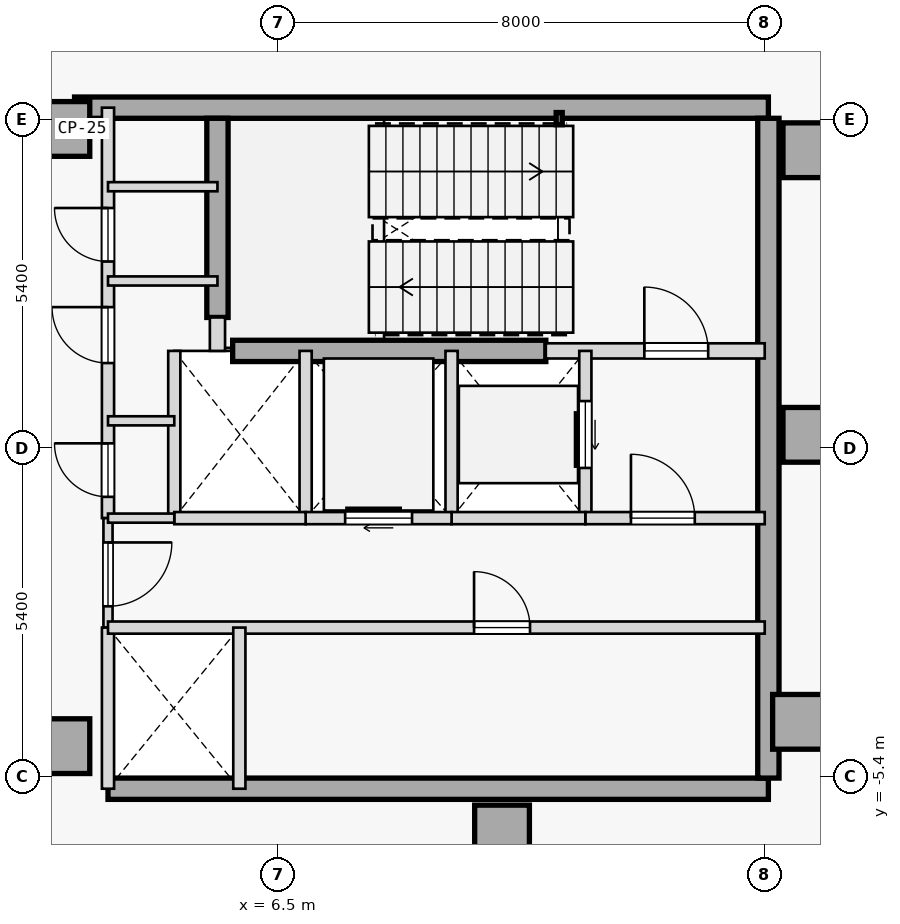
"""IFC4 building model, lengths in metres.
Left out: names, types, materials, properties, quantities, classifications, styles, units other than length and angle.
Written with IfcOpenShell. Run it as: python <this file> out.ifc"""

import sys

from ifc_helpers import new_model, si_unit, direction, frame, frame_2d, origin, origin_2d, place, context, subcontext, project, spatial, rectangle, hollow_rectangle, extrude, element, fill, save


model = new_model("IFC4")
c1 = context("Model", 3, precision=1e-05, world=origin(), true_north=direction((0.0, 1.0)))
c2 = subcontext(c1, "Body", "Model", "MODEL_VIEW")
j1 = project(units=[si_unit("LENGTHUNIT", "METRE"), si_unit("PLANEANGLEUNIT", "RADIAN")], contexts=[c1])
p1 = place(None, origin())
s1 = spatial("IfcSite", under=j1, at=p1, CompositionType="ELEMENT")
p2 = place(p1, origin())
s2 = spatial("IfcBuilding", under=s1, at=p2, CompositionType="ELEMENT")
p3 = place(p2, frame((0.0, 0.0, 254.45)))
s3 = spatial("IfcBuildingStorey", under=s2, at=p3, CompositionType="ELEMENT", Elevation=254.45)
for number, where, z_axis, x_axis in (
    (1, (15.25, 4.9, 0.0), (0.0, 0.0, 1.0), (1.0, 0.0, 0.0)),
    (2, (15.25, 0.22, 0.0), (0.0, 0.0, 1.0), (1.0, 0.0, 0.0)),
    (3, (15.08, -4.5, 0.0), (0.0, 0.0, 1.0), (1.0, 0.0, 0.0)),
    (4, (10.18, -6.32, 0.0), (0.0, 0.0, 1.0), (1.0, 0.0, 0.0)),
    (5, (2.95, -4.9, 0.0), (0.0, 0.0, 1.0), (1.0, 0.0, 0.0)),
    (6, (2.95, 5.25, 0.0), (0.0, 0.0, 1.0), (1.0, 0.0, 0.0)),
):
    element("IfcColumn", number, at=place(p3, frame(where, z_axis=z_axis, x_axis=x_axis)), inside=s3, PredefinedType="COLUMN", context=c2, shape_type="SweptSolid", body=[
        extrude(rectangle(XDim=0.9, YDim=0.9, at=origin_2d()), origin(), (0.0, 0.0, 1.0), 4.4),
    ])
p4 = place(p3, frame((3.15, 5.6, 0.0), z_axis=(0.0, 0.0, 1.0), x_axis=(1.0, 0.0, 0.0)))
e7 = element("IfcWall", 7, at=p4, inside=s3, PredefinedType="SHEAR", context=c2, shape_type="SweptSolid", body=[
    extrude(rectangle(XDim=11.41, YDim=0.35, at=frame_2d((5.705, 0.0))), origin(), (0.0, 0.0, 1.0), 4.175),
])
p5 = place(p3, frame((3.7, -5.6, 0.0), z_axis=(0.0, 0.0, 1.0), x_axis=(1.0, 0.0, 0.0)))
e8 = element("IfcWall", 8, at=p5, inside=s3, PredefinedType="SHEAR", context=c2, shape_type="SweptSolid", body=[
    extrude(rectangle(XDim=10.86, YDim=0.35, at=frame_2d((5.43, 0.0))), origin(), (0.0, 0.0, 1.0), 4.175),
])
p6 = place(p3, frame((14.56, -5.425, 0.0), z_axis=(0.0, 0.0, 1.0), x_axis=(0.0, 1.0, 0.0)))
e9 = element("IfcWall", 9, at=p6, inside=s3, PredefinedType="SHEAR", context=c2, shape_type="SweptSolid", body=[
    extrude(rectangle(XDim=10.85, YDim=0.35, at=frame_2d((5.425, 0.0))), origin(), (0.0, 0.0, 1.0), 4.175),
])
p7 = place(p3, frame((5.5, 2.15, 0.0), z_axis=(0.0, 0.0, 1.0), x_axis=(0.0, 1.0, 0.0)))
e10 = element("IfcWall", 10, at=p7, inside=s3, PredefinedType="SHEAR", context=c2, shape_type="SweptSolid", body=[
    extrude(rectangle(XDim=3.275, YDim=0.35, at=frame_2d((1.638, 0.0))), origin(), (0.0, 0.0, 1.0), 4.175),
])
p8 = place(p3, frame((5.75, 1.6, 0.0), z_axis=(0.0, 0.0, 1.0), x_axis=(1.0, 0.0, 0.0)))
e11 = element("IfcWall", 11, at=p8, inside=s3, PredefinedType="SHEAR", context=c2, shape_type="SweptSolid", body=[
    extrude(rectangle(XDim=5.15, YDim=0.35, at=frame_2d((2.575, 0.0))), origin(), (0.0, 0.0, 1.0), 4.175),
])
p9 = place(p3, frame((11.12, 5.42, 0.0), z_axis=(0.0, 0.0, 1.0), x_axis=(1.0, 0.0, 0.0)))
e12 = element("IfcColumn", 12, at=p9, inside=s3, PredefinedType="COLUMN", context=c2, shape_type="SweptSolid", body=[
    extrude(hollow_rectangle(XDim=0.1, YDim=0.2, WallThickness=0.008, at=origin_2d()), origin(), (0.0, 0.0, 1.0), 4.4),
])
p10 = place(p3, frame((18.109, 25.392, 0.0), z_axis=(0.0, 0.0, 1.0), x_axis=(-0.913544894419, -0.406737908095, 0.0)))
e13 = element("IfcWall", 13, at=p10, inside=s3, PredefinedType="STANDARD", context=c2, shape_type="SweptSolid", body=[
    extrude(rectangle(XDim=51.31, YDim=0.3, at=frame_2d((25.655, 0.0))), origin(), (0.0, 0.0, 1.0), 4.175),
])
p11 = place(p10, frame((27.87, 0.0, 0.0)))
e14 = element("IfcOpeningElement", 14, at=p11, cuts=e13, PredefinedType="OPENING", context=c2, shape_type="SweptSolid", body=[
    extrude(rectangle(XDim=1.1, YDim=2.2, at=frame_2d((0.55, 1.1))), frame((0.0, 0.16, 0.0), z_axis=(0.0, -1.0, 0.0), x_axis=(1.0, 0.0, 0.0)), (0.0, 0.0, 1.0), 0.32),
])
p12 = place(p3, frame((10.9, 1.6, 0.0), z_axis=(0.0, 0.0, 1.0), x_axis=(1.0, 0.0, 0.0)))
e15 = element("IfcWall", 15, at=p12, inside=s3, PredefinedType="STANDARD", context=c2, shape_type="SweptSolid", body=[
    extrude(rectangle(XDim=3.6, YDim=0.25, at=frame_2d((1.8, 0.0))), origin(), (0.0, 0.0, 1.0), 4.175),
])
p13 = place(p12, frame((1.62, 0.0, 0.0)))
e16 = element("IfcOpeningElement", 16, at=p13, cuts=e15, PredefinedType="OPENING", context=c2, shape_type="SweptSolid", body=[
    extrude(rectangle(XDim=1.05, YDim=2.15, at=frame_2d((0.525, 1.075))), frame((0.0, 0.135, 0.0), z_axis=(0.0, -1.0, 0.0), x_axis=(1.0, 0.0, 0.0)), (0.0, 0.0, 1.0), 0.27),
])
p14 = place(p3, frame((5.5, 1.6, 0.0), z_axis=(0.0, 0.0, 1.0), x_axis=(0.0, 1.0, 0.0)))
e17 = element("IfcWall", 17, at=p14, inside=s3, PredefinedType="STANDARD", context=c2, shape_type="SweptSolid", body=[
    extrude(rectangle(XDim=0.55, YDim=0.25, at=frame_2d((0.275, 0.0))), origin(), (0.0, 0.0, 1.0), 4.175),
])
p15 = place(p3, frame((3.7, -1.15, 0.0), z_axis=(0.0, 0.0, 1.0), x_axis=(0.0, 1.0, 0.0)))
e18 = element("IfcWall", 18, at=p15, inside=s3, PredefinedType="STANDARD", context=c2, shape_type="SweptSolid", body=[
    extrude(rectangle(XDim=6.75, YDim=0.2, at=frame_2d((3.375, 0.0))), origin(), (0.0, 0.0, 1.0), 4.175),
])
p16 = place(p15, frame((0.35, 0.0, 0.0)))
e19 = element("IfcOpeningElement", 19, at=p16, cuts=e18, PredefinedType="OPENING", context=c2, shape_type="SweptSolid", body=[
    extrude(rectangle(XDim=0.88, YDim=2.15, at=frame_2d((0.44, 1.075))), frame((0.0, 0.11, 0.0), z_axis=(0.0, -1.0, 0.0), x_axis=(1.0, 0.0, 0.0)), (0.0, 0.0, 1.0), 0.22),
])
p17 = place(p15, frame((2.55, 0.0, 0.0)))
e20 = element("IfcOpeningElement", 20, at=p17, cuts=e18, PredefinedType="OPENING", context=c2, shape_type="SweptSolid", body=[
    extrude(rectangle(XDim=0.92, YDim=2.15, at=frame_2d((0.46, 1.075))), frame((0.0, 0.11, 0.0), z_axis=(0.0, -1.0, 0.0), x_axis=(1.0, 0.0, 0.0)), (0.0, 0.0, 1.0), 0.22),
])
p18 = place(p15, frame((4.22, 0.0, 0.0)))
e21 = element("IfcOpeningElement", 21, at=p18, cuts=e18, PredefinedType="OPENING", context=c2, shape_type="SweptSolid", body=[
    extrude(rectangle(XDim=0.88, YDim=2.15, at=frame_2d((0.44, 1.075))), frame((0.0, 0.11, 0.0), z_axis=(0.0, -1.0, 0.0), x_axis=(1.0, 0.0, 0.0)), (0.0, 0.0, 1.0), 0.22),
])
p19 = place(p3, frame((3.7, -2.95, 0.0), z_axis=(0.0, 0.0, 1.0), x_axis=(0.0, 1.0, 0.0)))
e22 = element("IfcWall", 22, at=p19, inside=s3, PredefinedType="PARTITIONING", context=c2, shape_type="SweptSolid", body=[
    extrude(rectangle(XDim=1.8, YDim=0.15, at=frame_2d((0.9, 0.0))), origin(), (0.0, 0.0, 1.0), 4.175),
])
p20 = place(p19, frame((0.35, 0.0, 0.0)))
e23 = element("IfcOpeningElement", 23, at=p20, cuts=e22, PredefinedType="OPENING", context=c2, shape_type="SweptSolid", body=[
    extrude(rectangle(XDim=1.05, YDim=2.18, at=frame_2d((0.525, 1.09))), frame((0.0, 0.085, 0.0), z_axis=(0.0, -1.0, 0.0), x_axis=(1.0, 0.0, 0.0)), (0.0, 0.0, 1.0), 0.17),
])
p21 = place(p3, frame((3.7, -5.6, 0.0), z_axis=(0.0, 0.0, 1.0), x_axis=(0.0, 1.0, 0.0)))
e24 = element("IfcWall", 24, at=p21, inside=s3, PredefinedType="STANDARD", context=c2, shape_type="SweptSolid", body=[
    extrude(rectangle(XDim=2.65, YDim=0.2, at=frame_2d((1.325, 0.0))), origin(), (0.0, 0.0, 1.0), 4.175),
])
p22 = place(p3, frame((11.55, -1.15, 0.0), z_axis=(0.0, 0.0, 1.0), x_axis=(0.0, 1.0, 0.0)))
e25 = element("IfcWall", 25, at=p22, inside=s3, PredefinedType="STANDARD", context=c2, shape_type="SweptSolid", body=[
    extrude(rectangle(XDim=2.75, YDim=0.2, at=frame_2d((1.375, 0.0))), origin(), (0.0, 0.0, 1.0), 4.175),
])
p23 = place(p22, frame((0.825, 0.0, 0.0)))
e26 = element("IfcOpeningElement", 26, at=p23, cuts=e25, PredefinedType="OPENING", context=c2, shape_type="SweptSolid", body=[
    extrude(rectangle(XDim=1.1, YDim=2.15, at=frame_2d((0.55, 1.075))), frame((0.0, 0.11, 0.0), z_axis=(0.0, -1.0, 0.0), x_axis=(1.0, 0.0, 0.0)), (0.0, 0.0, 1.0), 0.22),
])
p24 = place(p3, frame((9.35, -1.15, 0.0), z_axis=(0.0, 0.0, 1.0), x_axis=(0.0, 1.0, 0.0)))
e27 = element("IfcWall", 27, at=p24, inside=s3, PredefinedType="STANDARD", context=c2, shape_type="SweptSolid", body=[
    extrude(rectangle(XDim=2.75, YDim=0.2, at=frame_2d((1.375, 0.0))), origin(), (0.0, 0.0, 1.0), 4.175),
])
p25 = place(p3, frame((11.55, -1.15, 0.0), z_axis=(0.0, 0.0, 1.0), x_axis=(1.0, 0.0, 0.0)))
e28 = element("IfcWall", 28, at=p25, inside=s3, PredefinedType="STANDARD", context=c2, shape_type="SweptSolid", body=[
    extrude(rectangle(XDim=2.95, YDim=0.2, at=frame_2d((1.475, 0.0))), origin(), (0.0, 0.0, 1.0), 4.175),
])
p26 = place(p25, frame((0.75, 0.0, 0.0)))
e29 = element("IfcOpeningElement", 29, at=p26, cuts=e28, PredefinedType="OPENING", context=c2, shape_type="SweptSolid", body=[
    extrude(rectangle(XDim=1.05, YDim=2.18, at=frame_2d((0.525, 1.09))), frame((0.0, 0.11, 0.0), z_axis=(0.0, -1.0, 0.0), x_axis=(1.0, 0.0, 0.0)), (0.0, 0.0, 1.0), 0.22),
])
p27 = place(p3, frame((9.35, -1.15, 0.0), z_axis=(0.0, 0.0, 1.0), x_axis=(1.0, 0.0, 0.0)))
e30 = element("IfcWall", 30, at=p27, inside=s3, PredefinedType="STANDARD", context=c2, shape_type="SweptSolid", body=[
    extrude(rectangle(XDim=2.2, YDim=0.2, at=frame_2d((1.1, 0.0))), origin(), (0.0, 0.0, 1.0), 4.175),
])
p28 = place(p3, frame((6.95, -1.15, 0.0), z_axis=(0.0, 0.0, 1.0), x_axis=(0.0, 1.0, 0.0)))
e31 = element("IfcWall", 31, at=p28, inside=s3, PredefinedType="STANDARD", context=c2, shape_type="SweptSolid", body=[
    extrude(rectangle(XDim=2.75, YDim=0.2, at=frame_2d((1.375, 0.0))), origin(), (0.0, 0.0, 1.0), 4.175),
])
p29 = place(p3, frame((6.95, -1.15, 0.0), z_axis=(0.0, 0.0, 1.0), x_axis=(1.0, 0.0, 0.0)))
e32 = element("IfcWall", 32, at=p29, inside=s3, PredefinedType="STANDARD", context=c2, shape_type="SweptSolid", body=[
    extrude(rectangle(XDim=2.4, YDim=0.2, at=frame_2d((1.2, 0.0))), origin(), (0.0, 0.0, 1.0), 4.175),
])
p30 = place(p29, frame((0.65, 0.0, 0.0)))
e33 = element("IfcOpeningElement", 33, at=p30, cuts=e32, PredefinedType="OPENING", context=c2, shape_type="SweptSolid", body=[
    extrude(rectangle(XDim=1.1, YDim=2.15, at=frame_2d((0.55, 1.075))), frame((0.0, 0.11, 0.0), z_axis=(0.0, -1.0, 0.0), x_axis=(1.0, 0.0, 0.0)), (0.0, 0.0, 1.0), 0.22),
])
p31 = place(p3, frame((4.79, -1.15, 0.0), z_axis=(0.0, 0.0, 1.0), x_axis=(0.0, 1.0, 0.0)))
e34 = element("IfcWall", 34, at=p31, inside=s3, PredefinedType="STANDARD", context=c2, shape_type="SweptSolid", body=[
    extrude(rectangle(XDim=2.75, YDim=0.2, at=frame_2d((1.375, 0.0))), origin(), (0.0, 0.0, 1.0), 4.175),
])
p32 = place(p3, frame((4.79, -1.15, 0.0), z_axis=(0.0, 0.0, 1.0), x_axis=(1.0, 0.0, 0.0)))
e35 = element("IfcWall", 35, at=p32, inside=s3, PredefinedType="STANDARD", context=c2, shape_type="SweptSolid", body=[
    extrude(rectangle(XDim=2.16, YDim=0.2, at=frame_2d((1.08, 0.0))), origin(), (0.0, 0.0, 1.0), 4.175),
])
p33 = place(p3, frame((3.7, -1.15, 0.0), z_axis=(0.0, 0.0, 1.0), x_axis=(1.0, 0.0, 0.0)))
e36 = element("IfcWall", 36, at=p33, inside=s3, PredefinedType="PARTITIONING", context=c2, shape_type="SweptSolid", body=[
    extrude(rectangle(XDim=1.09, YDim=0.15, at=frame_2d((0.545, 0.0))), origin(), (0.0, 0.0, 1.0), 4.175),
])
p34 = place(p3, frame((3.7, -2.95, 0.0), z_axis=(0.0, 0.0, 1.0), x_axis=(1.0, 0.0, 0.0)))
e37 = element("IfcWall", 37, at=p34, inside=s3, PredefinedType="STANDARD", context=c2, shape_type="SweptSolid", body=[
    extrude(rectangle(XDim=10.8, YDim=0.2, at=frame_2d((5.4, 0.0))), origin(), (0.0, 0.0, 1.0), 4.175),
])
p35 = place(p34, frame((6.02, 0.0, 0.0)))
e38 = element("IfcOpeningElement", 38, at=p35, cuts=e37, PredefinedType="OPENING", context=c2, shape_type="SweptSolid", body=[
    extrude(rectangle(XDim=0.92, YDim=2.15, at=frame_2d((0.46, 1.075))), frame((0.0, 0.11, 0.0), z_axis=(0.0, -1.0, 0.0), x_axis=(1.0, 0.0, 0.0)), (0.0, 0.0, 1.0), 0.22),
])
p36 = place(p3, frame((5.86, -5.6, 0.0), z_axis=(0.0, 0.0, 1.0), x_axis=(0.0, 1.0, 0.0)))
e39 = element("IfcWall", 39, at=p36, inside=s3, PredefinedType="STANDARD", context=c2, shape_type="SweptSolid", body=[
    extrude(rectangle(XDim=2.65, YDim=0.2, at=frame_2d((1.325, 0.0))), origin(), (0.0, 0.0, 1.0), 4.175),
])
p37 = place(p3, frame((3.7, 4.3, 0.0), z_axis=(0.0, 0.0, 1.0), x_axis=(1.0, 0.0, 0.0)))
e40 = element("IfcWall", 40, at=p37, inside=s3, PredefinedType="PARTITIONING", context=c2, shape_type="SweptSolid", body=[
    extrude(rectangle(XDim=1.8, YDim=0.15, at=frame_2d((0.9, 0.0))), origin(), (0.0, 0.0, 1.0), 4.175),
])
p38 = place(p3, frame((3.7, 0.45, 0.0), z_axis=(0.0, 0.0, 1.0), x_axis=(1.0, 0.0, 0.0)))
e41 = element("IfcWall", 41, at=p38, inside=s3, PredefinedType="PARTITIONING", context=c2, shape_type="SweptSolid", body=[
    extrude(rectangle(XDim=1.09, YDim=0.15, at=frame_2d((0.545, 0.0))), origin(), (0.0, 0.0, 1.0), 4.175),
])
p39 = place(p3, frame((3.7, 2.75, 0.0), z_axis=(0.0, 0.0, 1.0), x_axis=(1.0, 0.0, 0.0)))
e42 = element("IfcWall", 42, at=p39, inside=s3, PredefinedType="PARTITIONING", context=c2, shape_type="SweptSolid", body=[
    extrude(rectangle(XDim=1.8, YDim=0.15, at=frame_2d((0.9, 0.0))), origin(), (0.0, 0.0, 1.0), 4.175),
])
p40 = place(p13, origin())
e43 = element("IfcDoor", 43, at=p40, inside=s3, OperationType="SINGLE_SWING_LEFT", PredefinedType="DOOR", context=c2, shape_type="SweptSolid", body=[
    extrude(rectangle(XDim=1.05, YDim=2.15, at=frame_2d((0.525, 1.075))), frame((0.0, 0.025, 0.0), z_axis=(0.0, -1.0, 0.0), x_axis=(1.0, 0.0, 0.0)), (0.0, 0.0, 1.0), 0.05),
])
fill(e16, e43)
p41 = place(p26, origin())
e44 = element("IfcDoor", 44, at=p41, inside=s3, OperationType="SINGLE_SWING_LEFT", PredefinedType="DOOR", context=c2, shape_type="SweptSolid", body=[
    extrude(rectangle(XDim=1.05, YDim=2.18, at=frame_2d((0.525, 1.09))), frame((0.0, 0.025, 0.0), z_axis=(0.0, -1.0, 0.0), x_axis=(1.0, 0.0, 0.0)), (0.0, 0.0, 1.0), 0.05),
])
fill(e29, e44)
p42 = place(p20, frame((1.05, 0.0, 0.0), z_axis=(0.0, 0.0, 1.0), x_axis=(-1.0, 0.0, 0.0)))
e45 = element("IfcDoor", 45, at=p42, inside=s3, OperationType="SINGLE_SWING_RIGHT", PredefinedType="DOOR", context=c2, shape_type="SweptSolid", body=[
    extrude(rectangle(XDim=1.05, YDim=2.18, at=frame_2d((0.525, 1.09))), frame((0.0, 0.025, 0.0), z_axis=(0.0, -1.0, 0.0), x_axis=(1.0, 0.0, 0.0)), (0.0, 0.0, 1.0), 0.05),
])
fill(e23, e45)
p43 = place(p23, origin())
e46 = element("IfcDoor", 46, at=p43, inside=s3, OperationType="SLIDING_TO_RIGHT", PredefinedType="DOOR", context=c2, shape_type="SweptSolid", body=[
    extrude(rectangle(XDim=1.1, YDim=2.15, at=frame_2d((0.55, 1.075))), frame((0.0, 0.025, 0.0), z_axis=(0.0, -1.0, 0.0), x_axis=(1.0, 0.0, 0.0)), (0.0, 0.0, 1.0), 0.05),
])
fill(e26, e46)
p44 = place(p30, origin())
e47 = element("IfcDoor", 47, at=p44, inside=s3, OperationType="SLIDING_TO_RIGHT", PredefinedType="DOOR", context=c2, shape_type="SweptSolid", body=[
    extrude(rectangle(XDim=1.1, YDim=2.15, at=frame_2d((0.55, 1.075))), frame((0.0, 0.025, 0.0), z_axis=(0.0, -1.0, 0.0), x_axis=(1.0, 0.0, 0.0)), (0.0, 0.0, 1.0), 0.05),
])
fill(e33, e47)
p45 = place(p35, origin())
e48 = element("IfcDoor", 48, at=p45, inside=s3, OperationType="SINGLE_SWING_LEFT", PredefinedType="DOOR", context=c2, shape_type="SweptSolid", body=[
    extrude(rectangle(XDim=0.92, YDim=2.15, at=frame_2d((0.46, 1.075))), frame((0.0, 0.025, 0.0), z_axis=(0.0, -1.0, 0.0), x_axis=(1.0, 0.0, 0.0)), (0.0, 0.0, 1.0), 0.05),
])
fill(e38, e48)
p46 = place(p16, origin())
e49 = element("IfcDoor", 49, at=p46, inside=s3, OperationType="SINGLE_SWING_RIGHT", PredefinedType="DOOR", context=c2, shape_type="SweptSolid", body=[
    extrude(rectangle(XDim=0.88, YDim=2.15, at=frame_2d((0.44, 1.075))), frame((0.0, 0.025, 0.0), z_axis=(0.0, -1.0, 0.0), x_axis=(1.0, 0.0, 0.0)), (0.0, 0.0, 1.0), 0.05),
])
fill(e19, e49)
p47 = place(p17, origin())
e50 = element("IfcDoor", 50, at=p47, inside=s3, OperationType="SINGLE_SWING_RIGHT", PredefinedType="DOOR", context=c2, shape_type="SweptSolid", body=[
    extrude(rectangle(XDim=0.92, YDim=2.15, at=frame_2d((0.46, 1.075))), frame((0.0, 0.025, 0.0), z_axis=(0.0, -1.0, 0.0), x_axis=(1.0, 0.0, 0.0)), (0.0, 0.0, 1.0), 0.05),
])
fill(e20, e50)
p48 = place(p18, origin())
e51 = element("IfcDoor", 51, at=p48, inside=s3, OperationType="SINGLE_SWING_RIGHT", PredefinedType="DOOR", context=c2, shape_type="SweptSolid", body=[
    extrude(rectangle(XDim=0.88, YDim=2.15, at=frame_2d((0.44, 1.075))), frame((0.0, 0.025, 0.0), z_axis=(0.0, -1.0, 0.0), x_axis=(1.0, 0.0, 0.0)), (0.0, 0.0, 1.0), 0.05),
])
fill(e21, e51)
save(model, sys.argv[1])
